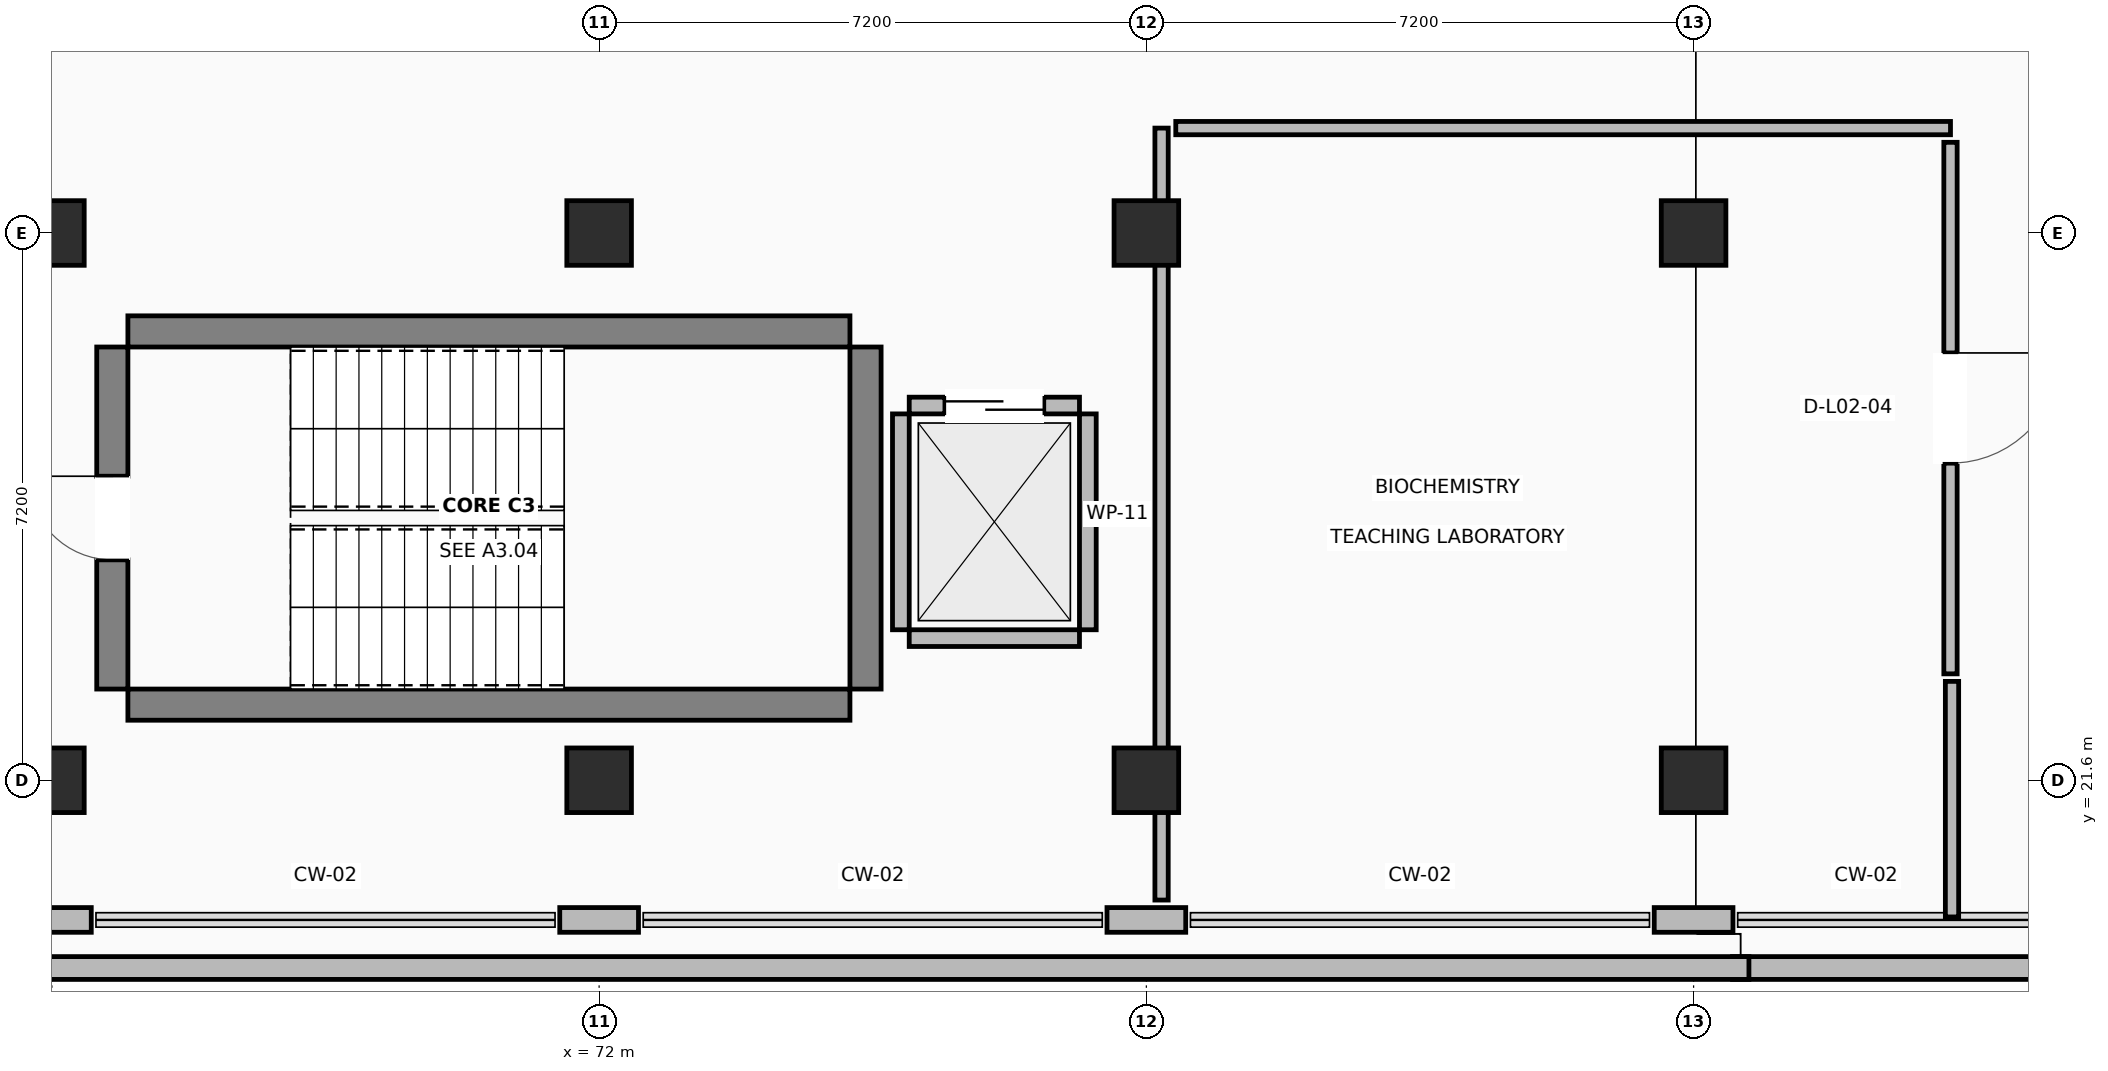
"""IFC4 building model, lengths in metres.
Left out: names, types, materials, properties, quantities, classifications, styles, units other than length and angle.
Written with IfcOpenShell. Run it as: python <this file> out.ifc"""

import sys

from ifc_helpers import new_model, si_unit, direction, frame, frame_2d, origin, origin_2d, place, context, subcontext, project, spatial, rectangle, extrude, element, fill, save


model = new_model("IFC4")
c1 = context("Model", 3, precision=1e-05, world=origin(), true_north=direction((0.0, 1.0)))
c2 = subcontext(c1, "Body", "Model", "MODEL_VIEW")
j1 = project(units=[si_unit("LENGTHUNIT", "METRE"), si_unit("PLANEANGLEUNIT", "RADIAN")], contexts=[c1])
p1 = place(None, origin())
s1 = spatial("IfcSite", under=j1, at=p1, CompositionType="ELEMENT")
p2 = place(p1, origin())
s2 = spatial("IfcBuilding", under=s1, at=p2, CompositionType="ELEMENT")
p3 = place(p2, frame((0.0, 0.0, 9.0)))
s3 = spatial("IfcBuildingStorey", under=s2, at=p3, CompositionType="ELEMENT", Elevation=9.0)
for number, where, z_axis, x_axis in (
    (1, (64.8, 21.6, 0.0), (0.0, 0.0, 1.0), (1.0, 0.0, 0.0)),
    (2, (64.8, 28.8, 0.0), (0.0, 0.0, 1.0), (1.0, 0.0, 0.0)),
    (3, (72.0, 21.6, 0.0), (0.0, 0.0, 1.0), (1.0, 0.0, 0.0)),
    (4, (72.0, 28.8, 0.0), (0.0, 0.0, 1.0), (1.0, 0.0, 0.0)),
    (5, (79.2, 21.6, 0.0), (0.0, 0.0, 1.0), (1.0, 0.0, 0.0)),
    (6, (79.2, 28.8, 0.0), (0.0, 0.0, 1.0), (1.0, 0.0, 0.0)),
    (7, (86.4, 21.6, 0.0), (0.0, 0.0, 1.0), (1.0, 0.0, 0.0)),
    (8, (86.4, 28.8, 0.0), (0.0, 0.0, 1.0), (1.0, 0.0, 0.0)),
):
    element("IfcColumn", number, at=place(p3, frame(where, z_axis=z_axis, x_axis=x_axis)), inside=s3, PredefinedType="COLUMN", context=c2, shape_type="SweptSolid", body=[
        extrude(rectangle(XDim=0.85, YDim=0.85, at=origin_2d()), origin(), (0.0, 0.0, 1.0), 4.22),
    ])
for number, where, z_axis, x_axis in (
    (9, (65.8, 22.595, 0.0), (0.0, 0.0, 1.0), (1.0, 0.0, 0.0)),
    (10, (65.8, 27.505, 0.0), (0.0, 0.0, 1.0), (1.0, 0.0, 0.0)),
):
    element("IfcWall", number, at=place(p3, frame(where, z_axis=z_axis, x_axis=x_axis)), inside=s3, PredefinedType="SHEAR", context=c2, shape_type="SweptSolid", body=[
        extrude(rectangle(XDim=9.5, YDim=0.41, at=frame_2d((4.75, 0.0))), origin(), (0.0, 0.0, 1.0), 4.22),
    ])
p4 = place(p3, frame((65.595, 22.8, 0.0), z_axis=(0.0, 0.0, 1.0), x_axis=(0.0, 1.0, 0.0)))
e11 = element("IfcWall", 11, at=p4, inside=s3, PredefinedType="SHEAR", context=c2, shape_type="SweptSolid", body=[
    extrude(rectangle(XDim=4.5, YDim=0.41, at=frame_2d((2.25, 0.0))), origin(), (0.0, 0.0, 1.0), 4.22),
])
p5 = place(p4, frame((1.7, 0.0, 0.0)))
e12 = element("IfcOpeningElement", 12, at=p5, cuts=e11, PredefinedType="OPENING", context=c2, shape_type="SweptSolid", body=[
    extrude(rectangle(XDim=1.1, YDim=2.15, at=frame_2d((0.55, 1.075))), frame((0.0, 0.215, 0.0), z_axis=(0.0, -1.0, 0.0), x_axis=(1.0, 0.0, 0.0)), (0.0, 0.0, 1.0), 0.43),
])
p6 = place(p3, frame((75.505, 22.8, 0.0), z_axis=(0.0, 0.0, 1.0), x_axis=(0.0, 1.0, 0.0)))
e13 = element("IfcWall", 13, at=p6, inside=s3, PredefinedType="SHEAR", context=c2, shape_type="SweptSolid", body=[
    extrude(rectangle(XDim=4.5, YDim=0.41, at=frame_2d((2.25, 0.0))), origin(), (0.0, 0.0, 1.0), 4.22),
])
for number, where, z_axis, x_axis in (
    (14, (64.282, 19.762, 0.0), (0.0, 0.0, 1.0), (1.0, 0.0, 0.0)),
    (15, (71.482, 19.762, 0.0), (0.0, 0.0, 1.0), (1.0, 0.0, 0.0)),
    (16, (78.682, 19.762, 0.0), (0.0, 0.0, 1.0), (1.0, 0.0, 0.0)),
):
    element("IfcWall", number, at=place(p3, frame(where, z_axis=z_axis, x_axis=x_axis)), inside=s3, PredefinedType="STANDARD", context=c2, shape_type="SweptSolid", body=[
        extrude(rectangle(XDim=1.036, YDim=0.325, at=frame_2d((0.518, 0.0))), origin(), (0.0, 0.0, 1.0), 3.26),
    ])
p7 = place(p3, frame((85.882, 19.762, 0.0), z_axis=(0.0, 0.0, 1.0), x_axis=(1.0, 0.0, 0.0)))
e17 = element("IfcWall", 17, at=p7, inside=s3, PredefinedType="STANDARD", context=c2, shape_type="SweptSolid", body=[
    extrude(rectangle(XDim=1.036, YDim=0.325, at=frame_2d((0.518, 0.0))), origin(), (0.0, 0.0, 1.0), 3.26),
])
p8 = place(p3, frame((115.82, 19.13, 0.0), z_axis=(0.0, 0.0, 1.0), x_axis=(-1.0, 0.0, 0.0)))
e18 = element("IfcWall", 18, at=p8, inside=s3, PredefinedType="PARAPET", context=c2, shape_type="SweptSolid", body=[
    extrude(rectangle(XDim=28.908, YDim=0.3, at=frame_2d((14.454, 0.0))), origin(), (0.0, 0.0, 1.0), 1.18),
])
p9 = place(p3, frame((87.128, 19.13, 0.0), z_axis=(0.0, 0.0, 1.0), x_axis=(-1.0, 0.0, 0.0)))
e19 = element("IfcWall", 19, at=p9, inside=s3, PredefinedType="PARAPET", context=c2, shape_type="SweptSolid", body=[
    extrude(rectangle(XDim=29.498, YDim=0.3, at=frame_2d((14.749, 0.0))), origin(), (0.0, 0.0, 1.0), 1.18),
])
p10 = place(p3, frame((76.08, 23.47, 0.0), z_axis=(0.0, 0.0, 1.0), x_axis=(1.0, 0.0, 0.0)))
e20 = element("IfcWall", 20, at=p10, inside=s3, PredefinedType="STANDARD", context=c2, shape_type="SweptSolid", body=[
    extrude(rectangle(XDim=2.24, YDim=0.22, at=frame_2d((1.12, 0.0))), origin(), (0.0, 0.0, 1.0), 3.26),
])
p11 = place(p3, frame((76.08, 26.53, 0.0), z_axis=(0.0, 0.0, 1.0), x_axis=(1.0, 0.0, 0.0)))
e21 = element("IfcWall", 21, at=p11, inside=s3, PredefinedType="STANDARD", context=c2, shape_type="SweptSolid", body=[
    extrude(rectangle(XDim=2.24, YDim=0.22, at=frame_2d((1.12, 0.0))), origin(), (0.0, 0.0, 1.0), 3.26),
])
p12 = place(p11, frame((0.47, 0.0, 0.0)))
e22 = element("IfcOpeningElement", 22, at=p12, cuts=e21, PredefinedType="OPENING", context=c2, shape_type="SweptSolid", body=[
    extrude(rectangle(XDim=1.3, YDim=2.2, at=frame_2d((0.65, 1.1))), frame((0.0, 0.12, 0.0), z_axis=(0.0, -1.0, 0.0), x_axis=(1.0, 0.0, 0.0)), (0.0, 0.0, 1.0), 0.24),
])
for number, where, z_axis, x_axis in (
    (23, (75.97, 23.58, 0.0), (0.0, 0.0, 1.0), (0.0, 1.0, 0.0)),
    (24, (78.43, 23.58, 0.0), (0.0, 0.0, 1.0), (0.0, 1.0, 0.0)),
):
    element("IfcWall", number, at=place(p3, frame(where, z_axis=z_axis, x_axis=x_axis)), inside=s3, PredefinedType="STANDARD", context=c2, shape_type="SweptSolid", body=[
        extrude(rectangle(XDim=2.84, YDim=0.22, at=frame_2d((1.42, 0.0))), origin(), (0.0, 0.0, 1.0), 3.26),
    ])
p13 = place(p3, frame((79.4, 20.024, 0.0), z_axis=(0.0, 0.0, 1.0), x_axis=(0.0, 1.0, 0.0)))
e25 = element("IfcWall", 25, at=p13, inside=s3, PredefinedType="PARTITIONING", context=c2, shape_type="SweptSolid", body=[
    extrude(rectangle(XDim=10.156, YDim=0.175, at=frame_2d((5.078, 0.0))), origin(), (0.0, 0.0, 1.0), 3.26),
])
p14 = place(p3, frame((79.587, 30.18, 0.0), z_axis=(0.0, 0.0, 1.0), x_axis=(1.0, 0.0, 0.0)))
e26 = element("IfcWall", 26, at=p14, inside=s3, PredefinedType="PARTITIONING", context=c2, shape_type="SweptSolid", body=[
    extrude(rectangle(XDim=10.193, YDim=0.175, at=frame_2d((5.097, 0.0))), origin(), (0.0, 0.0, 1.0), 3.26),
])
p15 = place(p3, frame((89.78, 29.993, 0.0), z_axis=(0.0, 0.0, 1.0), x_axis=(0.0, -1.0, 0.0)))
e27 = element("IfcWall", 27, at=p15, inside=s3, PredefinedType="PARTITIONING", context=c2, shape_type="SweptSolid", body=[
    extrude(rectangle(XDim=6.993, YDim=0.175, at=frame_2d((3.497, 0.0))), origin(), (0.0, 0.0, 1.0), 3.26),
])
p16 = place(p15, frame((2.771, 0.0, 0.0)))
e28 = element("IfcOpeningElement", 28, at=p16, cuts=e27, PredefinedType="OPENING", context=c2, shape_type="SweptSolid", body=[
    extrude(rectangle(XDim=1.45, YDim=2.2, at=frame_2d((0.725, 1.1))), frame((0.0, 0.097, 0.0), z_axis=(0.0, -1.0, 0.0), x_axis=(1.0, 0.0, 0.0)), (0.0, 0.0, 1.0), 0.195),
])
p17 = place(p3, frame((89.8, 22.901, 0.0), z_axis=(0.0, 0.0, 1.0), x_axis=(0.0, -1.0, 0.0)))
e29 = element("IfcWall", 29, at=p17, inside=s3, PredefinedType="PARTITIONING", context=c2, shape_type="SweptSolid", body=[
    extrude(rectangle(XDim=3.099, YDim=0.175, at=frame_2d((1.549, 0.0))), origin(), (0.0, 0.0, 1.0), 3.26),
])
p18 = place(p5, origin())
e30 = element("IfcDoor", 30, at=p18, inside=s3, OperationType="SINGLE_SWING_RIGHT", PredefinedType="DOOR", context=c2, shape_type="SweptSolid", body=[
    extrude(rectangle(XDim=1.1, YDim=2.15, at=frame_2d((0.55, 1.075))), frame((0.0, 0.025, 0.0), z_axis=(0.0, -1.0, 0.0), x_axis=(1.0, 0.0, 0.0)), (0.0, 0.0, 1.0), 0.05),
])
fill(e12, e30)
p19 = place(p12, origin())
e31 = element("IfcDoor", 31, at=p19, inside=s3, OperationType="SLIDING_TO_RIGHT", PredefinedType="DOOR", context=c2, shape_type="SweptSolid", body=[
    extrude(rectangle(XDim=1.3, YDim=2.2, at=frame_2d((0.65, 1.1))), frame((0.0, 0.025, 0.0), z_axis=(0.0, -1.0, 0.0), x_axis=(1.0, 0.0, 0.0)), (0.0, 0.0, 1.0), 0.05),
])
fill(e22, e31)
p20 = place(p16, origin())
e32 = element("IfcDoor", 32, at=p20, inside=s3, OperationType="SINGLE_SWING_LEFT", PredefinedType="DOOR", context=c2, shape_type="SweptSolid", body=[
    extrude(rectangle(XDim=1.45, YDim=2.2, at=frame_2d((0.725, 1.1))), frame((0.0, 0.025, 0.0), z_axis=(0.0, -1.0, 0.0), x_axis=(1.0, 0.0, 0.0)), (0.0, 0.0, 1.0), 0.05),
])
fill(e28, e32)
save(model, sys.argv[1])
